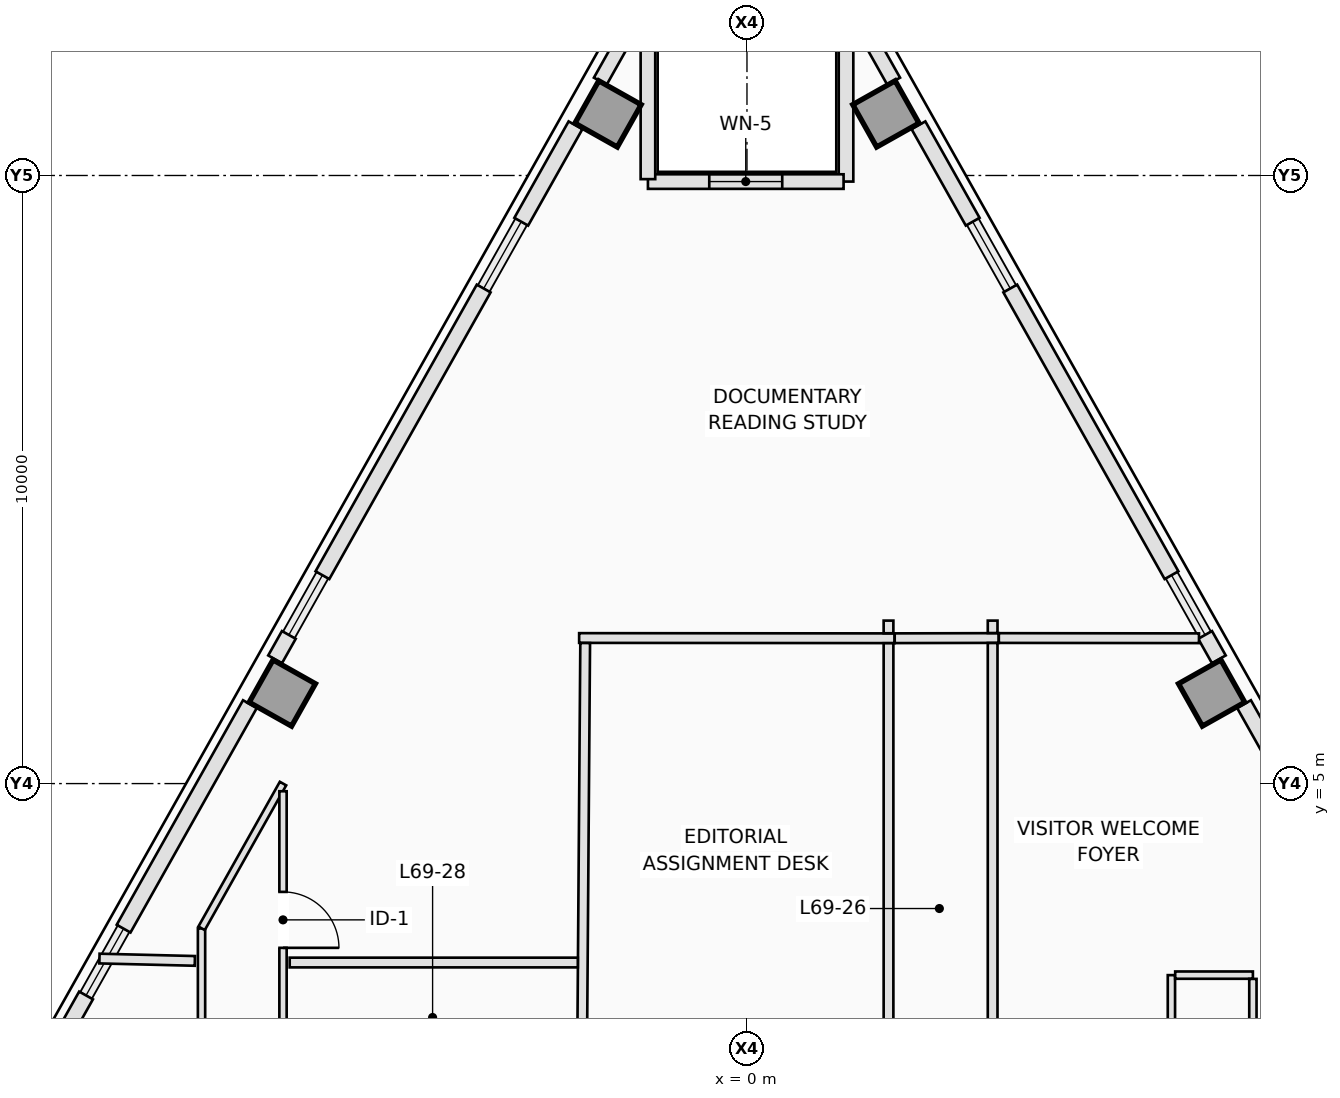
"""IFC4 building model, lengths in metres.
Left out: names, types, materials, properties, quantities, classifications, styles, units other than length and angle.
Written with IfcOpenShell. Run it as: python <this file> out.ifc"""

import sys

from ifc_helpers import new_model, si_unit, direction, frame, frame_2d, origin, origin_2d, place, context, subcontext, project, spatial, rectangle, extrude, element, fill, save


model = new_model("IFC4")
c1 = context("Model", 3, precision=1e-05, world=origin(), true_north=direction((0.0, 1.0)))
c2 = subcontext(c1, "Body", "Model", "MODEL_VIEW")
j1 = project(units=[si_unit("LENGTHUNIT", "METRE"), si_unit("PLANEANGLEUNIT", "RADIAN")], contexts=[c1])
p1 = place(None, origin())
s1 = spatial("IfcSite", under=j1, at=p1, CompositionType="ELEMENT")
p2 = place(p1, origin())
s2 = spatial("IfcBuilding", under=s1, at=p2, CompositionType="ELEMENT")
p3 = place(p2, frame((0.0, 0.0, 249.9)))
s3 = spatial("IfcBuildingStorey", under=s2, at=p3, CompositionType="ELEMENT", Elevation=249.9)
for number, where, z_axis, x_axis in (
    (1, (7.642, 6.489, 0.0), (0.0, 0.0, 1.0), (0.872, 0.49, 0.0)),
    (2, (2.285, 16.012, 0.0), (0.0, 0.0, 1.0), (0.872, 0.49, 0.0)),
    (3, (-2.285, 16.012, 0.0), (0.0, 0.0, 1.0), (-0.872, 0.49, 0.0)),
    (4, (-7.642, 6.489, 0.0), (0.0, 0.0, 1.0), (-0.872, 0.49, 0.0)),
):
    element("IfcColumn", number, at=place(p3, frame(where, z_axis=z_axis, x_axis=x_axis)), inside=s3, PredefinedType="COLUMN", context=c2, shape_type="SweptSolid", body=[
        extrude(rectangle(XDim=0.8, YDim=0.8, at=origin_2d()), origin(), (0.0, 0.0, 1.0), 3.5),
    ])
p4 = place(p3, frame((1.95, 17.373, 0.0), z_axis=(0.0, 0.0, 1.0), x_axis=(0.490199895283, -0.871610040479, 0.0)))
e5 = element("IfcWall", 5, at=p4, inside=s3, PredefinedType="STANDARD", context=c2, shape_type="SweptSolid", body=[
    extrude(rectangle(XDim=0.945, YDim=0.24, at=frame_2d((0.472, 0.0))), origin(), (0.0, 0.0, 1.0), 3.25),
])
p5 = place(p3, frame((2.82, 15.826, 0.0), z_axis=(0.0, 0.0, 1.0), x_axis=(0.490261239633, -0.871575537125, 0.0)))
e6 = element("IfcWall", 6, at=p5, inside=s3, PredefinedType="STANDARD", context=c2, shape_type="SweptSolid", body=[
    extrude(rectangle(XDim=1.82, YDim=0.26, at=frame_2d((0.91, 0.0))), origin(), (0.0, 0.0, 1.0), 3.25),
])
p6 = place(p3, frame((4.33, 13.142, 0.0), z_axis=(0.0, 0.0, 1.0), x_axis=(0.490265525523, -0.871573126297, 0.0)))
e7 = element("IfcWall", 7, at=p6, inside=s3, PredefinedType="STANDARD", context=c2, shape_type="SweptSolid", body=[
    extrude(rectangle(XDim=5.409, YDim=0.26, at=frame_2d((2.705, 0.0))), origin(), (0.0, 0.0, 1.0), 3.25),
])
p7 = place(p3, frame((7.534, 7.445, 0.0), z_axis=(0.0, 0.0, 1.0), x_axis=(0.490412424957, -0.871490478116, 0.0)))
e8 = element("IfcWall", 8, at=p7, inside=s3, PredefinedType="STANDARD", context=c2, shape_type="SweptSolid", body=[
    extrude(rectangle(XDim=0.46, YDim=0.26, at=frame_2d((0.23, 0.0))), origin(), (0.0, 0.0, 1.0), 3.25),
])
p8 = place(p3, frame((8.174, 6.307, 0.0), z_axis=(0.0, 0.0, 1.0), x_axis=(0.490269447258, -0.871570920284, 0.0)))
e9 = element("IfcWall", 9, at=p8, inside=s3, PredefinedType="STANDARD", context=c2, shape_type="SweptSolid", body=[
    extrude(rectangle(XDim=4.237, YDim=0.26, at=frame_2d((2.118, 0.0))), origin(), (0.0, 0.0, 1.0), 3.25),
])
p9 = place(p3, frame((-2.413, 16.549, 0.0), z_axis=(0.0, 0.0, 1.0), x_axis=(0.490199895283, 0.871610040479, 0.0)))
e10 = element("IfcWall", 10, at=p9, inside=s3, PredefinedType="STANDARD", context=c2, shape_type="SweptSolid", body=[
    extrude(rectangle(XDim=0.945, YDim=0.24, at=frame_2d((0.472, 0.0))), origin(), (0.0, 0.0, 1.0), 3.25),
])
p10 = place(p3, frame((-7.76, 7.044, 0.0), z_axis=(0.0, 0.0, 1.0), x_axis=(0.490412424957, 0.871490478116, 0.0)))
e11 = element("IfcWall", 11, at=p10, inside=s3, PredefinedType="STANDARD", context=c2, shape_type="SweptSolid", body=[
    extrude(rectangle(XDim=0.46, YDim=0.26, at=frame_2d((0.23, 0.0))), origin(), (0.0, 0.0, 1.0), 3.25),
])
p11 = place(p3, frame((-6.982, 8.427, 0.0), z_axis=(0.0, 0.0, 1.0), x_axis=(0.490265525523, 0.871573126297, 0.0)))
e12 = element("IfcWall", 12, at=p11, inside=s3, PredefinedType="STANDARD", context=c2, shape_type="SweptSolid", body=[
    extrude(rectangle(XDim=5.409, YDim=0.26, at=frame_2d((2.705, 0.0))), origin(), (0.0, 0.0, 1.0), 3.25),
])
p12 = place(p3, frame((-3.712, 14.24, 0.0), z_axis=(0.0, 0.0, 1.0), x_axis=(0.490261239633, 0.871575537125, 0.0)))
e13 = element("IfcWall", 13, at=p12, inside=s3, PredefinedType="STANDARD", context=c2, shape_type="SweptSolid", body=[
    extrude(rectangle(XDim=1.82, YDim=0.26, at=frame_2d((0.91, 0.0))), origin(), (0.0, 0.0, 1.0), 3.25),
])
p13 = place(p3, frame((-12.946, -2.177, 0.0), z_axis=(0.0, 0.0, 1.0), x_axis=(0.490244825075, 0.871584770109, 0.0)))
e14 = element("IfcWall", 14, at=p13, inside=s3, PredefinedType="STANDARD", context=c2, shape_type="SweptSolid", body=[
    extrude(rectangle(XDim=4.237, YDim=0.26, at=frame_2d((2.119, 0.0))), origin(), (0.0, 0.0, 1.0), 3.25),
])
p14 = place(p3, frame((-10.251, 2.615, 0.0), z_axis=(0.0, 0.0, 1.0), x_axis=(0.490269447258, 0.871570920284, 0.0)))
e15 = element("IfcWall", 15, at=p14, inside=s3, PredefinedType="STANDARD", context=c2, shape_type="SweptSolid", body=[
    extrude(rectangle(XDim=4.237, YDim=0.26, at=frame_2d((2.118, 0.0))), origin(), (0.0, 0.0, 1.0), 3.25),
])
p15 = place(p3, frame((1.629, 17.4, 0.0), z_axis=(0.0, 0.0, 1.0), x_axis=(0.0, -1.0, 0.0)))
e16 = element("IfcWall", 16, at=p15, inside=s3, PredefinedType="STANDARD", context=c2, shape_type="SweptSolid", body=[
    extrude(rectangle(XDim=2.5, YDim=0.24, at=frame_2d((1.25, 0.0))), origin(), (0.0, 0.0, 1.0), 3.25),
])
p16 = place(p3, frame((1.589, 14.9, 0.0), z_axis=(0.0, 0.0, 1.0), x_axis=(-1.0, 0.0, 0.0)))
e17 = element("IfcWall", 17, at=p16, inside=s3, PredefinedType="STANDARD", context=c2, shape_type="SweptSolid", body=[
    extrude(rectangle(XDim=3.218, YDim=0.24, at=frame_2d((1.609, 0.0))), origin(), (0.0, 0.0, 1.0), 3.25),
])
p17 = place(p16, frame((1.009, 0.0, 0.9)))
e18 = element("IfcOpeningElement", 18, at=p17, cuts=e17, PredefinedType="OPENING", context=c2, shape_type="SweptSolid", body=[
    extrude(rectangle(XDim=1.2, YDim=1.8, at=frame_2d((0.6, 0.9))), frame((0.0, 0.13, 0.0), z_axis=(0.0, -1.0, 0.0), x_axis=(1.0, 0.0, 0.0)), (0.0, 0.0, 1.0), 0.26),
])
p18 = place(p3, frame((-1.629, 14.94, 0.0), z_axis=(0.0, 0.0, 1.0), x_axis=(0.0, 1.0, 0.0)))
e19 = element("IfcWall", 19, at=p18, inside=s3, PredefinedType="STANDARD", context=c2, shape_type="SweptSolid", body=[
    extrude(rectangle(XDim=2.46, YDim=0.24, at=frame_2d((1.23, 0.0))), origin(), (0.0, 0.0, 1.0), 3.25),
])
p19 = place(p3, frame((-8.97, -2.668, 0.0), z_axis=(0.0, 0.0, 1.0), x_axis=(0.0, 1.0, 0.0)))
e20 = element("IfcWall", 20, at=p19, inside=s3, PredefinedType="PARTITIONING", context=c2, shape_type="SweptSolid", body=[
    extrude(rectangle(XDim=5.286, YDim=0.12, at=frame_2d((2.643, 0.0))), origin(), (0.0, 0.0, 1.0), 3.25),
])
p20 = place(p19, frame((2.791, 0.0, 0.0)))
e21 = element("IfcOpeningElement", 21, at=p20, cuts=e20, PredefinedType="OPENING", context=c2, shape_type="SweptSolid", body=[
    extrude(rectangle(XDim=0.92, YDim=2.12, at=frame_2d((0.46, 1.06))), frame((0.0, 0.07, 0.0), z_axis=(0.0, -1.0, 0.0), x_axis=(1.0, 0.0, 0.0)), (0.0, 0.0, 1.0), 0.14),
])
p21 = place(p3, frame((-8.969, 2.62, 0.0), z_axis=(0.0, 0.0, 1.0), x_axis=(0.490341880416, 0.871530171773, 0.0)))
e22 = element("IfcWall", 22, at=p21, inside=s3, PredefinedType="PARTITIONING", context=c2, shape_type="SweptSolid", body=[
    extrude(rectangle(XDim=2.731, YDim=0.12, at=frame_2d((1.365, 0.0))), origin(), (0.0, 0.0, 1.0), 3.25),
])
p22 = place(p3, frame((-7.63, 4.874, 0.0), z_axis=(0.0, 0.0, 1.0), x_axis=(0.0, -1.0, 0.0)))
e23 = element("IfcWall", 23, at=p22, inside=s3, PredefinedType="PARTITIONING", context=c2, shape_type="SweptSolid", body=[
    extrude(rectangle(XDim=7.604, YDim=0.12, at=frame_2d((3.802, 0.0))), origin(), (0.0, 0.0, 1.0), 3.25),
])
p23 = place(p22, frame((1.655, 0.0, 0.0)))
e24 = element("IfcOpeningElement", 24, at=p23, cuts=e23, PredefinedType="OPENING", context=c2, shape_type="SweptSolid", body=[
    extrude(rectangle(XDim=0.92, YDim=2.12, at=frame_2d((0.46, 1.06))), frame((0.0, 0.07, 0.0), z_axis=(0.0, -1.0, 0.0), x_axis=(1.0, 0.0, 0.0)), (0.0, 0.0, 1.0), 0.14),
])
p24 = place(p22, frame((4.62, 0.0, 0.0)))
e25 = element("IfcOpeningElement", 25, at=p24, cuts=e23, PredefinedType="OPENING", context=c2, shape_type="SweptSolid", body=[
    extrude(rectangle(XDim=0.92, YDim=2.12, at=frame_2d((0.46, 1.06))), frame((0.0, 0.07, 0.0), z_axis=(0.0, -1.0, 0.0), x_axis=(1.0, 0.0, 0.0)), (0.0, 0.0, 1.0), 0.14),
])
p25 = place(p3, frame((6.98, -2.668, 0.0), z_axis=(0.0, 0.0, 1.0), x_axis=(0.0, 1.0, 0.0)))
e26 = element("IfcWall", 26, at=p25, inside=s3, PredefinedType="PARTITIONING", context=c2, shape_type="SweptSolid", body=[
    extrude(rectangle(XDim=4.518, YDim=0.12, at=frame_2d((2.259, 0.0))), origin(), (0.0, 0.0, 1.0), 3.25),
])
p26 = place(p25, frame((1.768, 0.0, 0.0)))
e27 = element("IfcOpeningElement", 27, at=p26, cuts=e26, PredefinedType="OPENING", context=c2, shape_type="SweptSolid", body=[
    extrude(rectangle(XDim=0.92, YDim=2.12, at=frame_2d((0.46, 1.06))), frame((0.0, 0.07, 0.0), z_axis=(0.0, -1.0, 0.0), x_axis=(1.0, 0.0, 0.0)), (0.0, 0.0, 1.0), 0.14),
])
p27 = place(p3, frame((7.042, 1.85, 0.0), z_axis=(0.0, 0.0, 1.0), x_axis=(1.0, 0.0, 0.0)))
e28 = element("IfcWall", 28, at=p27, inside=s3, PredefinedType="PARTITIONING", context=c2, shape_type="SweptSolid", body=[
    extrude(rectangle(XDim=1.278, YDim=0.12, at=frame_2d((0.639, 0.0))), origin(), (0.0, 0.0, 1.0), 3.25),
])
p28 = place(p3, frame((8.32, 1.788, 0.0), z_axis=(0.0, 0.0, 1.0), x_axis=(0.0, -1.0, 0.0)))
e29 = element("IfcWall", 29, at=p28, inside=s3, PredefinedType="PARTITIONING", context=c2, shape_type="SweptSolid", body=[
    extrude(rectangle(XDim=4.518, YDim=0.12, at=frame_2d((2.259, 0.0))), origin(), (0.0, 0.0, 1.0), 3.25),
])
p29 = place(p3, frame((2.427, 7.39, 0.0), z_axis=(0.0, 0.0, 1.0), x_axis=(-0.999999716487, 0.000753011835, 0.0)))
e30 = element("IfcWall", 30, at=p29, inside=s3, PredefinedType="PARTITIONING", context=c2, shape_type="SweptSolid", body=[
    extrude(rectangle(XDim=5.188, YDim=0.16, at=frame_2d((2.594, 0.0))), origin(), (0.0, 0.0, 1.0), 3.25),
])
p30 = place(p3, frame((-2.661, 7.312, 0.0), z_axis=(0.0, 0.0, 1.0), x_axis=(-0.007477531623, -0.99997204287, 0.0)))
e31 = element("IfcWall", 31, at=p30, inside=s3, PredefinedType="PARTITIONING", context=c2, shape_type="SweptSolid", body=[
    extrude(rectangle(XDim=7.02, YDim=0.16, at=frame_2d((3.51, 0.0))), origin(), (0.0, 0.0, 1.0), 3.25),
])
p31 = place(p3, frame((4.14, 7.394, 0.0), z_axis=(0.0, 0.0, 1.0), x_axis=(-0.99999800286, -0.001998568457, 0.0)))
e32 = element("IfcWall", 32, at=p31, inside=s3, PredefinedType="PARTITIONING", context=c2, shape_type="SweptSolid", body=[
    extrude(rectangle(XDim=1.71, YDim=0.16, at=frame_2d((0.855, 0.0))), origin(), (0.0, 0.0, 1.0), 3.25),
])
p32 = place(p3, frame((7.433, 7.39, 0.0), z_axis=(0.0, 0.0, 1.0), x_axis=(-0.999999460761, 0.001038498068, 0.0)))
e33 = element("IfcWall", 33, at=p32, inside=s3, PredefinedType="PARTITIONING", context=c2, shape_type="SweptSolid", body=[
    extrude(rectangle(XDim=3.291, YDim=0.16, at=frame_2d((1.646, 0.0))), origin(), (0.0, 0.0, 1.0), 3.25),
])
p33 = place(p3, frame((-2.782, 2.057, 0.0), z_axis=(0.0, 0.0, 1.0), x_axis=(-1.0, 0.0, 0.0)))
e34 = element("IfcWall", 34, at=p33, inside=s3, PredefinedType="PARTITIONING", context=c2, shape_type="SweptSolid", body=[
    extrude(rectangle(XDim=4.738, YDim=0.16, at=frame_2d((2.369, 0.0))), origin(), (0.0, 0.0, 1.0), 2.943),
])
p34 = place(p3, frame((-9.08, 2.084, 0.0), z_axis=(0.0, 0.0, 1.0), x_axis=(-0.999697673559, 0.024587831946, 0.0)))
e35 = element("IfcWall", 35, at=p34, inside=s3, PredefinedType="PARTITIONING", context=c2, shape_type="SweptSolid", body=[
    extrude(rectangle(XDim=1.569, YDim=0.16, at=frame_2d((0.784, 0.0))), origin(), (0.0, 0.0, 1.0), 3.25),
])
p35 = place(p3, frame((2.328, 7.68, 0.0), z_axis=(0.0, 0.0, 1.0), x_axis=(0.0, -1.0, 0.0)))
e36 = element("IfcWall", 36, at=p35, inside=s3, PredefinedType="PARTITIONING", context=c2, shape_type="SweptSolid", body=[
    extrude(rectangle(XDim=0.208, YDim=0.16, at=frame_2d((0.104, 0.0))), origin(), (0.0, 0.0, 1.0), 3.25),
])
p36 = place(p3, frame((2.328, 7.308, 0.0), z_axis=(0.0, 0.0, 1.0), x_axis=(0.0, -1.0, 0.0)))
e37 = element("IfcWall", 37, at=p36, inside=s3, PredefinedType="PARTITIONING", context=c2, shape_type="SweptSolid", body=[
    extrude(rectangle(XDim=9.928, YDim=0.16, at=frame_2d((4.964, 0.0))), origin(), (0.0, 0.0, 1.0), 3.25),
])
p37 = place(p3, frame((4.04, 7.68, 0.0), z_axis=(0.0, 0.0, 1.0), x_axis=(0.0, -1.0, 0.0)))
e38 = element("IfcWall", 38, at=p37, inside=s3, PredefinedType="PARTITIONING", context=c2, shape_type="SweptSolid", body=[
    extrude(rectangle(XDim=0.204, YDim=0.16, at=frame_2d((0.102, 0.0))), origin(), (0.0, 0.0, 1.0), 3.25),
])
p38 = place(p3, frame((4.04, 7.312, 0.0), z_axis=(0.0, 0.0, 1.0), x_axis=(0.0, -1.0, 0.0)))
e39 = element("IfcWall", 39, at=p38, inside=s3, PredefinedType="PARTITIONING", context=c2, shape_type="SweptSolid", body=[
    extrude(rectangle(XDim=9.932, YDim=0.16, at=frame_2d((4.966, 0.0))), origin(), (0.0, 0.0, 1.0), 3.25),
])
p39 = place(p17, origin())
e40 = element("IfcWindow", 40, at=p39, inside=s3, PartitioningType="SINGLE_PANEL", PredefinedType="WINDOW", context=c2, shape_type="SweptSolid", body=[
    extrude(rectangle(XDim=1.2, YDim=1.8, at=frame_2d((0.6, 0.9))), frame((0.0, 0.03, 0.0), z_axis=(0.0, -1.0, 0.0), x_axis=(1.0, 0.0, 0.0)), (0.0, 0.0, 1.0), 0.06),
])
fill(e18, e40)
p40 = place(p23, origin())
e41 = element("IfcDoor", 41, at=p40, inside=s3, OperationType="SINGLE_SWING_RIGHT", PredefinedType="DOOR", context=c2, shape_type="SweptSolid", body=[
    extrude(rectangle(XDim=0.92, YDim=2.12, at=frame_2d((0.46, 1.06))), frame((0.0, 0.025, 0.0), z_axis=(0.0, -1.0, 0.0), x_axis=(1.0, 0.0, 0.0)), (0.0, 0.0, 1.0), 0.05),
])
fill(e24, e41)
save(model, sys.argv[1])
